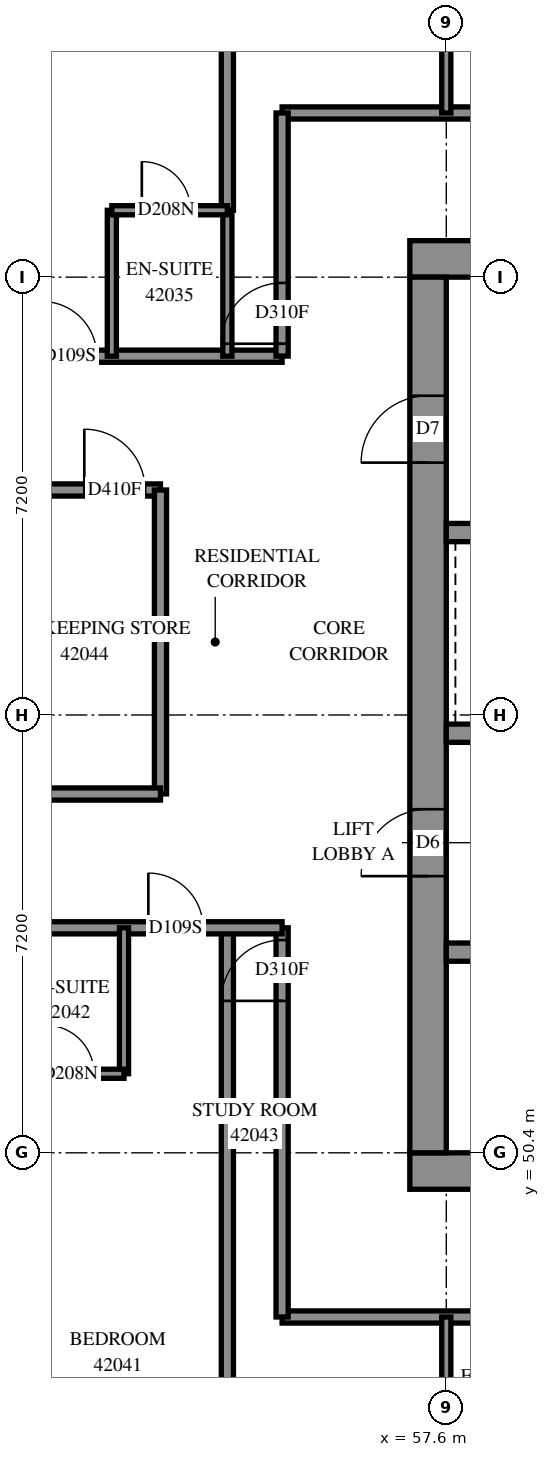
"""IFC4 building model, lengths in metres.
Left out: names, types, materials, properties, quantities, classifications, styles, units other than length and angle.
Written with IfcOpenShell. Run it as: python <this file> out.ifc"""

import sys

from ifc_helpers import new_model, si_unit, direction, frame, frame_2d, origin, place, context, subcontext, project, spatial, rectangle, extrude, element, fill, save


model = new_model("IFC4")
c1 = context("Model", 3, precision=1e-05, world=origin(), true_north=direction((0.0, 1.0)))
c2 = subcontext(c1, "Body", "Model", "MODEL_VIEW")
j1 = project(units=[si_unit("LENGTHUNIT", "METRE"), si_unit("PLANEANGLEUNIT", "RADIAN")], contexts=[c1])
p1 = place(None, origin())
s1 = spatial("IfcSite", under=j1, at=p1, CompositionType="ELEMENT")
p2 = place(p1, origin())
s2 = spatial("IfcBuilding", under=s1, at=p2, CompositionType="ELEMENT")
p3 = place(p2, frame((0.0, 0.0, 155.8)))
s3 = spatial("IfcBuildingStorey", under=s2, at=p3, CompositionType="ELEMENT", Elevation=155.8)
p4 = place(p3, frame((57.0, 50.1, -0.3), z_axis=(0.0, 0.0, 1.0), x_axis=(1.0, 0.0, 0.0)))
e1 = element("IfcWall", 1, at=p4, inside=s3, PredefinedType="SHEAR", context=c2, shape_type="SweptSolid", body=[
    extrude(rectangle(XDim=15.6, YDim=0.6, at=frame_2d((7.8, 0.0))), origin(), (0.0, 0.0, 1.0), 2.7),
])
p5 = place(p3, frame((57.0, 65.1, -0.3), z_axis=(0.0, 0.0, 1.0), x_axis=(1.0, 0.0, 0.0)))
e2 = element("IfcWall", 2, at=p5, inside=s3, PredefinedType="SHEAR", context=c2, shape_type="SweptSolid", body=[
    extrude(rectangle(XDim=15.6, YDim=0.6, at=frame_2d((7.8, 0.0))), origin(), (0.0, 0.0, 1.0), 2.7),
])
p6 = place(p5, frame((10.6, 0.0, 0.3)))
e3 = element("IfcOpeningElement", 3, at=p6, cuts=e2, PredefinedType="OPENING", context=c2, shape_type="SweptSolid", body=[
    extrude(rectangle(XDim=0.8, YDim=2.1, at=frame_2d((0.4, 1.05))), frame((0.0, 0.31, 0.0), z_axis=(0.0, -1.0, 0.0), x_axis=(1.0, 0.0, 0.0)), (0.0, 0.0, 1.0), 0.62),
])
p7 = place(p3, frame((57.3, 50.4, -0.3), z_axis=(0.0, 0.0, 1.0), x_axis=(0.0, 1.0, 0.0)))
e4 = element("IfcWall", 4, at=p7, inside=s3, PredefinedType="SHEAR", context=c2, shape_type="SweptSolid", body=[
    extrude(rectangle(XDim=14.4, YDim=0.6, at=frame_2d((7.2, 0.0))), origin(), (0.0, 0.0, 1.0), 2.7),
])
p8 = place(p7, frame((4.55, 0.0, 0.3)))
e5 = element("IfcOpeningElement", 5, at=p8, cuts=e4, PredefinedType="OPENING", context=c2, shape_type="SweptSolid", body=[
    extrude(rectangle(XDim=1.1, YDim=2.1, at=frame_2d((0.55, 1.05))), frame((0.0, 0.31, 0.0), z_axis=(0.0, -1.0, 0.0), x_axis=(1.0, 0.0, 0.0)), (0.0, 0.0, 1.0), 0.62),
])
p9 = place(p7, frame((11.35, 0.0, 0.3)))
e6 = element("IfcOpeningElement", 6, at=p9, cuts=e4, PredefinedType="OPENING", context=c2, shape_type="SweptSolid", body=[
    extrude(rectangle(XDim=1.1, YDim=2.1, at=frame_2d((0.55, 1.05))), frame((0.0, 0.31, 0.0), z_axis=(0.0, -1.0, 0.0), x_axis=(1.0, 0.0, 0.0)), (0.0, 0.0, 1.0), 0.62),
])
p10 = place(p3, frame((57.6, 53.7, 0.0), z_axis=(0.0, 0.0, 1.0), x_axis=(1.0, 0.0, 0.0)))
e7 = element("IfcWall", 7, at=p10, inside=s3, PredefinedType="SOLIDWALL", context=c2, shape_type="SweptSolid", body=[
    extrude(rectangle(XDim=14.4, YDim=0.3, at=frame_2d((7.2, 0.0))), origin(), (0.0, 0.0, 1.0), 3.1),
])
p11 = place(p10, frame((1.35, 0.0, 0.0)))
e8 = element("IfcOpeningElement", 8, at=p11, cuts=e7, PredefinedType="OPENING", context=c2, shape_type="SweptSolid", body=[
    extrude(rectangle(XDim=0.9, YDim=2.1, at=frame_2d((0.45, 1.05))), frame((0.0, 0.16, 0.0), z_axis=(0.0, -1.0, 0.0), x_axis=(1.0, 0.0, 0.0)), (0.0, 0.0, 1.0), 0.32),
])
p12 = place(p10, frame((4.95, 0.0, 0.0)))
e9 = element("IfcOpeningElement", 9, at=p12, cuts=e7, PredefinedType="OPENING", context=c2, shape_type="SweptSolid", body=[
    extrude(rectangle(XDim=0.9, YDim=2.1, at=frame_2d((0.45, 1.05))), frame((0.0, 0.16, 0.0), z_axis=(0.0, -1.0, 0.0), x_axis=(1.0, 0.0, 0.0)), (0.0, 0.0, 1.0), 0.32),
])
p13 = place(p10, frame((8.55, 0.0, 0.0)))
e10 = element("IfcOpeningElement", 10, at=p13, cuts=e7, PredefinedType="OPENING", context=c2, shape_type="SweptSolid", body=[
    extrude(rectangle(XDim=0.9, YDim=2.1, at=frame_2d((0.45, 1.05))), frame((0.0, 0.16, 0.0), z_axis=(0.0, -1.0, 0.0), x_axis=(1.0, 0.0, 0.0)), (0.0, 0.0, 1.0), 0.32),
])
p14 = place(p10, frame((12.05, 0.0, 0.0)))
e11 = element("IfcOpeningElement", 11, at=p14, cuts=e7, PredefinedType="OPENING", context=c2, shape_type="SweptSolid", body=[
    extrude(rectangle(XDim=1.1, YDim=2.1, at=frame_2d((0.55, 1.05))), frame((0.0, 0.16, 0.0), z_axis=(0.0, -1.0, 0.0), x_axis=(1.0, 0.0, 0.0)), (0.0, 0.0, 1.0), 0.32),
])
p15 = place(p3, frame((57.6, 57.3, 0.0), z_axis=(0.0, 0.0, 1.0), x_axis=(1.0, 0.0, 0.0)))
e12 = element("IfcWall", 12, at=p15, inside=s3, PredefinedType="SOLIDWALL", context=c2, shape_type="SweptSolid", body=[
    extrude(rectangle(XDim=14.4, YDim=0.3, at=frame_2d((7.2, 0.0))), origin(), (0.0, 0.0, 1.0), 3.1),
])
p16 = place(p15, frame((1.25, 0.0, 0.0)))
e13 = element("IfcOpeningElement", 13, at=p16, cuts=e12, PredefinedType="OPENING", context=c2, shape_type="SweptSolid", body=[
    extrude(rectangle(XDim=1.1, YDim=2.1, at=frame_2d((0.55, 1.05))), frame((0.0, 0.16, 0.0), z_axis=(0.0, -1.0, 0.0), x_axis=(1.0, 0.0, 0.0)), (0.0, 0.0, 1.0), 0.32),
])
p17 = place(p15, frame((4.85, 0.0, 0.0)))
e14 = element("IfcOpeningElement", 14, at=p17, cuts=e12, PredefinedType="OPENING", context=c2, shape_type="SweptSolid", body=[
    extrude(rectangle(XDim=1.1, YDim=2.1, at=frame_2d((0.55, 1.05))), frame((0.0, 0.16, 0.0), z_axis=(0.0, -1.0, 0.0), x_axis=(1.0, 0.0, 0.0)), (0.0, 0.0, 1.0), 0.32),
])
p18 = place(p15, frame((8.45, 0.0, 0.0)))
e15 = element("IfcOpeningElement", 15, at=p18, cuts=e12, PredefinedType="OPENING", context=c2, shape_type="SweptSolid", body=[
    extrude(rectangle(XDim=1.1, YDim=2.1, at=frame_2d((0.55, 1.05))), frame((0.0, 0.16, 0.0), z_axis=(0.0, -1.0, 0.0), x_axis=(1.0, 0.0, 0.0)), (0.0, 0.0, 1.0), 0.32),
])
p19 = place(p15, frame((12.05, 0.0, 0.0)))
e16 = element("IfcOpeningElement", 16, at=p19, cuts=e12, PredefinedType="OPENING", context=c2, shape_type="SweptSolid", body=[
    extrude(rectangle(XDim=1.1, YDim=2.1, at=frame_2d((0.55, 1.05))), frame((0.0, 0.16, 0.0), z_axis=(0.0, -1.0, 0.0), x_axis=(1.0, 0.0, 0.0)), (0.0, 0.0, 1.0), 0.32),
])
p20 = place(p3, frame((57.6, 60.6, 0.0), z_axis=(0.0, 0.0, 1.0), x_axis=(1.0, 0.0, 0.0)))
e17 = element("IfcWall", 17, at=p20, inside=s3, PredefinedType="SOLIDWALL", context=c2, shape_type="SweptSolid", body=[
    extrude(rectangle(XDim=7.2, YDim=0.3, at=frame_2d((3.6, 0.0))), origin(), (0.0, 0.0, 1.0), 3.1),
])
p21 = place(p3, frame((54.9, 67.5, 0.0), z_axis=(0.0, 0.0, 1.0), x_axis=(1.0, 0.0, 0.0)))
e18 = element("IfcWall", 18, at=p21, inside=s3, PredefinedType="PARTITIONING", context=c2, shape_type="SweptSolid", body=[
    extrude(rectangle(XDim=19.8, YDim=0.2, at=frame_2d((9.9, 0.0))), origin(), (0.0, 0.0, 1.0), 3.1),
])
p22 = place(p21, frame((6.599, 0.0, 0.0)))
e19 = element("IfcOpeningElement", 19, at=p22, cuts=e18, PredefinedType="OPENING", context=c2, shape_type="SweptSolid", body=[
    extrude(rectangle(XDim=0.9, YDim=2.1, at=frame_2d((0.45, 1.05))), frame((0.0, 0.11, 0.0), z_axis=(0.0, -1.0, 0.0), x_axis=(1.0, 0.0, 0.0)), (0.0, 0.0, 1.0), 0.22),
])
p23 = place(p21, frame((13.799, 0.0, 0.0)))
e20 = element("IfcOpeningElement", 20, at=p23, cuts=e18, PredefinedType="OPENING", context=c2, shape_type="SweptSolid", body=[
    extrude(rectangle(XDim=0.9, YDim=2.1, at=frame_2d((0.45, 1.05))), frame((0.0, 0.11, 0.0), z_axis=(0.0, -1.0, 0.0), x_axis=(1.0, 0.0, 0.0)), (0.0, 0.0, 1.0), 0.22),
])
p24 = place(p3, frame((54.9, 47.7, 0.0), z_axis=(0.0, 0.0, 1.0), x_axis=(1.0, 0.0, 0.0)))
e21 = element("IfcWall", 21, at=p24, inside=s3, PredefinedType="PARTITIONING", context=c2, shape_type="SweptSolid", body=[
    extrude(rectangle(XDim=19.326, YDim=0.2, at=frame_2d((9.663, 0.0))), origin(), (0.0, 0.0, 1.0), 3.1),
])
p25 = place(p24, frame((6.643, 0.0, 0.0)))
e22 = element("IfcOpeningElement", 22, at=p25, cuts=e21, PredefinedType="OPENING", context=c2, shape_type="SweptSolid", body=[
    extrude(rectangle(XDim=0.9, YDim=2.1, at=frame_2d((0.45, 1.05))), frame((0.0, 0.11, 0.0), z_axis=(0.0, -1.0, 0.0), x_axis=(1.0, 0.0, 0.0)), (0.0, 0.0, 1.0), 0.22),
])
p26 = place(p24, frame((13.843, 0.0, 0.0)))
e23 = element("IfcOpeningElement", 23, at=p26, cuts=e21, PredefinedType="OPENING", context=c2, shape_type="SweptSolid", body=[
    extrude(rectangle(XDim=0.9, YDim=2.1, at=frame_2d((0.45, 1.05))), frame((0.0, 0.11, 0.0), z_axis=(0.0, -1.0, 0.0), x_axis=(1.0, 0.0, 0.0)), (0.0, 0.0, 1.0), 0.22),
])
p27 = place(p3, frame((36.0, 61.3, 0.0), z_axis=(0.0, 0.0, 1.0), x_axis=(1.0, 0.0, 0.0)))
e24 = element("IfcWall", 24, at=p27, inside=s3, PredefinedType="PARTITIONING", context=c2, shape_type="SweptSolid", body=[
    extrude(rectangle(XDim=16.9, YDim=0.2, at=frame_2d((8.45, 0.0))), origin(), (0.0, 0.0, 1.0), 3.1),
])
p28 = place(p27, frame((2.3, 0.0, 0.0)))
e25 = element("IfcOpeningElement", 25, at=p28, cuts=e24, PredefinedType="OPENING", context=c2, shape_type="SweptSolid", body=[
    extrude(rectangle(XDim=0.9, YDim=2.1, at=frame_2d((0.45, 1.05))), frame((0.0, 0.11, 0.0), z_axis=(0.0, -1.0, 0.0), x_axis=(1.0, 0.0, 0.0)), (0.0, 0.0, 1.0), 0.22),
])
p29 = place(p27, frame((4.125, 0.0, 0.0)))
e26 = element("IfcOpeningElement", 26, at=p29, cuts=e24, PredefinedType="OPENING", context=c2, shape_type="SweptSolid", body=[
    extrude(rectangle(XDim=1.0, YDim=2.1, at=frame_2d((0.5, 1.05))), frame((0.0, 0.11, 0.0), z_axis=(0.0, -1.0, 0.0), x_axis=(1.0, 0.0, 0.0)), (0.0, 0.0, 1.0), 0.22),
])
p30 = place(p27, frame((9.5, 0.0, 0.0)))
e27 = element("IfcOpeningElement", 27, at=p30, cuts=e24, PredefinedType="OPENING", context=c2, shape_type="SweptSolid", body=[
    extrude(rectangle(XDim=0.9, YDim=2.1, at=frame_2d((0.45, 1.05))), frame((0.0, 0.11, 0.0), z_axis=(0.0, -1.0, 0.0), x_axis=(1.0, 0.0, 0.0)), (0.0, 0.0, 1.0), 0.22),
])
p31 = place(p27, frame((11.325, 0.0, 0.0)))
e28 = element("IfcOpeningElement", 28, at=p31, cuts=e24, PredefinedType="OPENING", context=c2, shape_type="SweptSolid", body=[
    extrude(rectangle(XDim=1.0, YDim=2.1, at=frame_2d((0.5, 1.05))), frame((0.0, 0.11, 0.0), z_axis=(0.0, -1.0, 0.0), x_axis=(1.0, 0.0, 0.0)), (0.0, 0.0, 1.0), 0.22),
])
p32 = place(p27, frame((15.647, 0.0, 0.0)))
e29 = element("IfcOpeningElement", 29, at=p32, cuts=e24, PredefinedType="OPENING", context=c2, shape_type="SweptSolid", body=[
    extrude(rectangle(XDim=1.0, YDim=2.1, at=frame_2d((0.5, 1.05))), frame((0.0, 0.11, 0.0), z_axis=(0.0, -1.0, 0.0), x_axis=(1.0, 0.0, 0.0)), (0.0, 0.0, 1.0), 0.22),
])
p33 = place(p3, frame((40.702, 63.5, 0.0), z_axis=(0.0, 0.0, 1.0), x_axis=(1.0, 0.0, 0.0)))
e30 = element("IfcWall", 30, at=p33, inside=s3, PredefinedType="PARTITIONING", context=c2, shape_type="SweptSolid", body=[
    extrude(rectangle(XDim=14.198, YDim=0.2, at=frame_2d((7.099, 0.0))), origin(), (0.0, 0.0, 1.0), 3.1),
])
p34 = place(p33, frame((6.692, 0.0, 0.0)))
e31 = element("IfcOpeningElement", 31, at=p34, cuts=e30, PredefinedType="OPENING", context=c2, shape_type="SweptSolid", body=[
    extrude(rectangle(XDim=0.9, YDim=2.1, at=frame_2d((0.45, 1.05))), frame((0.0, 0.11, 0.0), z_axis=(0.0, -1.0, 0.0), x_axis=(1.0, 0.0, 0.0)), (0.0, 0.0, 1.0), 0.22),
])
p35 = place(p33, frame((10.25, 0.0, 0.0)))
e32 = element("IfcOpeningElement", 32, at=p35, cuts=e30, PredefinedType="OPENING", context=c2, shape_type="SweptSolid", body=[
    extrude(rectangle(XDim=0.9, YDim=2.1, at=frame_2d((0.45, 1.05))), frame((0.0, 0.11, 0.0), z_axis=(0.0, -1.0, 0.0), x_axis=(1.0, 0.0, 0.0)), (0.0, 0.0, 1.0), 0.22),
])
p36 = place(p3, frame((54.0, 42.309, 0.0), z_axis=(0.0, 0.0, 1.0), x_axis=(0.0, 1.0, 0.0)))
e33 = element("IfcWall", 33, at=p36, inside=s3, PredefinedType="PARTITIONING", context=c2, shape_type="SweptSolid", body=[
    extrude(rectangle(XDim=11.791, YDim=0.2, at=frame_2d((5.895, 0.0))), origin(), (0.0, 0.0, 1.0), 3.1),
])
p37 = place(p3, frame((54.0, 65.9, 0.0), z_axis=(0.0, 0.0, 1.0), x_axis=(0.0, 1.0, 0.0)))
e34 = element("IfcWall", 34, at=p37, inside=s3, PredefinedType="PARTITIONING", context=c2, shape_type="SweptSolid", body=[
    extrude(rectangle(XDim=6.855, YDim=0.2, at=frame_2d((3.428, 0.0))), origin(), (0.0, 0.0, 1.0), 3.1),
])
p38 = place(p3, frame((54.9, 47.7, 0.0), z_axis=(0.0, 0.0, 1.0), x_axis=(0.0, 1.0, 0.0)))
e35 = element("IfcWall", 35, at=p38, inside=s3, PredefinedType="PARTITIONING", context=c2, shape_type="SweptSolid", body=[
    extrude(rectangle(XDim=6.4, YDim=0.2, at=frame_2d((3.2, 0.0))), origin(), (0.0, 0.0, 1.0), 3.1),
])
p39 = place(p38, frame((5.199, 0.0, 0.0)))
e36 = element("IfcOpeningElement", 36, at=p39, cuts=e35, PredefinedType="OPENING", context=c2, shape_type="SweptSolid", body=[
    extrude(rectangle(XDim=1.0, YDim=2.1, at=frame_2d((0.5, 1.05))), frame((0.0, 0.11, 0.0), z_axis=(0.0, -1.0, 0.0), x_axis=(1.0, 0.0, 0.0)), (0.0, 0.0, 1.0), 0.22),
])
p40 = place(p3, frame((52.9, 56.302, 0.0), z_axis=(0.0, 0.0, 1.0), x_axis=(0.0, 1.0, 0.0)))
e37 = element("IfcWall", 37, at=p40, inside=s3, PredefinedType="PARTITIONING", context=c2, shape_type="SweptSolid", body=[
    extrude(rectangle(XDim=4.998, YDim=0.2, at=frame_2d((2.499, 0.0))), origin(), (0.0, 0.0, 1.0), 3.1),
])
p41 = place(p3, frame((50.4, 54.1, 0.0), z_axis=(0.0, 0.0, 1.0), x_axis=(1.0, 0.0, 0.0)))
e38 = element("IfcWall", 38, at=p41, inside=s3, PredefinedType="PARTITIONING", context=c2, shape_type="SweptSolid", body=[
    extrude(rectangle(XDim=4.5, YDim=0.2, at=frame_2d((2.25, 0.0))), origin(), (0.0, 0.0, 1.0), 3.1),
])
p42 = place(p41, frame((2.3, 0.0, 0.0)))
e39 = element("IfcOpeningElement", 39, at=p42, cuts=e38, PredefinedType="OPENING", context=c2, shape_type="SweptSolid", body=[
    extrude(rectangle(XDim=0.9, YDim=2.1, at=frame_2d((0.45, 1.05))), frame((0.0, 0.11, 0.0), z_axis=(0.0, -1.0, 0.0), x_axis=(1.0, 0.0, 0.0)), (0.0, 0.0, 1.0), 0.22),
])
p43 = place(p3, frame((54.9, 63.502, 0.0), z_axis=(0.0, 0.0, 1.0), x_axis=(0.0, 1.0, 0.0)))
e40 = element("IfcWall", 40, at=p43, inside=s3, PredefinedType="PARTITIONING", context=c2, shape_type="SweptSolid", body=[
    extrude(rectangle(XDim=3.998, YDim=0.2, at=frame_2d((1.999, 0.0))), origin(), (0.0, 0.0, 1.0), 3.1),
])
p44 = place(p43, frame((0.203, 0.0, 0.0)))
e41 = element("IfcOpeningElement", 41, at=p44, cuts=e40, PredefinedType="OPENING", context=c2, shape_type="SweptSolid", body=[
    extrude(rectangle(XDim=1.0, YDim=2.1, at=frame_2d((0.5, 1.05))), frame((0.0, 0.11, 0.0), z_axis=(0.0, -1.0, 0.0), x_axis=(1.0, 0.0, 0.0)), (0.0, 0.0, 1.0), 0.22),
])
p45 = place(p3, frame((50.4, 56.3, 0.0), z_axis=(0.0, 0.0, 1.0), x_axis=(1.0, 0.0, 0.0)))
e42 = element("IfcWall", 42, at=p45, inside=s3, PredefinedType="PARTITIONING", context=c2, shape_type="SweptSolid", body=[
    extrude(rectangle(XDim=2.5, YDim=0.2, at=frame_2d((1.25, 0.0))), origin(), (0.0, 0.0, 1.0), 3.1),
])
for number, where, z_axis, x_axis in (
    (43, (52.1, 63.5, 0.0), (0.0, 0.0, 1.0), (0.0, 1.0, 0.0)),
    (44, (54.0, 63.5, 0.0), (0.0, 0.0, 1.0), (0.0, 1.0, 0.0)),
    (45, (57.6, 45.3, 0.0), (0.0, 0.0, 1.0), (0.0, 1.0, 0.0)),
    (46, (57.6, 67.5, 0.0), (0.0, 0.0, 1.0), (0.0, 1.0, 0.0)),
    (47, (52.3, 51.7, 0.0), (0.0, 0.0, 1.0), (0.0, 1.0, 0.0)),
):
    element("IfcWall", number, at=place(p3, frame(where, z_axis=z_axis, x_axis=x_axis)), inside=s3, PredefinedType="PARTITIONING", context=c2, shape_type="SweptSolid", body=[
        extrude(rectangle(XDim=2.4, YDim=0.15, at=frame_2d((1.2, 0.0))), origin(), (0.0, 0.0, 1.0), 3.1),
    ])
p46 = place(p3, frame((52.1, 65.9, 0.0), z_axis=(0.0, 0.0, 1.0), x_axis=(1.0, 0.0, 0.0)))
e48 = element("IfcWall", 48, at=p46, inside=s3, PredefinedType="PARTITIONING", context=c2, shape_type="SweptSolid", body=[
    extrude(rectangle(XDim=1.9, YDim=0.15, at=frame_2d((0.95, 0.0))), origin(), (0.0, 0.0, 1.0), 3.1),
])
p47 = place(p46, frame((0.493, 0.0, 0.0)))
e49 = element("IfcOpeningElement", 49, at=p47, cuts=e48, PredefinedType="OPENING", context=c2, shape_type="SweptSolid", body=[
    extrude(rectangle(XDim=0.8, YDim=2.1, at=frame_2d((0.4, 1.05))), frame((0.0, 0.085, 0.0), z_axis=(0.0, -1.0, 0.0), x_axis=(1.0, 0.0, 0.0)), (0.0, 0.0, 1.0), 0.17),
])
p48 = place(p3, frame((50.4, 51.7, 0.0), z_axis=(0.0, 0.0, 1.0), x_axis=(1.0, 0.0, 0.0)))
e50 = element("IfcWall", 50, at=p48, inside=s3, PredefinedType="PARTITIONING", context=c2, shape_type="SweptSolid", body=[
    extrude(rectangle(XDim=1.9, YDim=0.15, at=frame_2d((0.95, 0.0))), origin(), (0.0, 0.0, 1.0), 3.1),
])
p49 = place(p48, frame((0.607, 0.0, 0.0)))
e51 = element("IfcOpeningElement", 51, at=p49, cuts=e50, PredefinedType="OPENING", context=c2, shape_type="SweptSolid", body=[
    extrude(rectangle(XDim=0.8, YDim=2.1, at=frame_2d((0.4, 1.05))), frame((0.0, 0.085, 0.0), z_axis=(0.0, -1.0, 0.0), x_axis=(1.0, 0.0, 0.0)), (0.0, 0.0, 1.0), 0.17),
])
p50 = place(p8, origin())
e52 = element("IfcDoor", 52, at=p50, inside=s3, OperationType="DOUBLE_DOOR_SINGLE_SWING", PredefinedType="DOOR", context=c2, shape_type="SweptSolid", body=[
    extrude(rectangle(XDim=1.1, YDim=2.1, at=frame_2d((0.55, 1.05))), frame((0.0, 0.025, 0.0), z_axis=(0.0, -1.0, 0.0), x_axis=(1.0, 0.0, 0.0)), (0.0, 0.0, 1.0), 0.05),
])
fill(e5, e52)
p51 = place(p9, origin())
e53 = element("IfcDoor", 53, at=p51, inside=s3, OperationType="SINGLE_SWING_LEFT", PredefinedType="DOOR", context=c2, shape_type="SweptSolid", body=[
    extrude(rectangle(XDim=1.1, YDim=2.1, at=frame_2d((0.55, 1.05))), frame((0.0, 0.025, 0.0), z_axis=(0.0, -1.0, 0.0), x_axis=(1.0, 0.0, 0.0)), (0.0, 0.0, 1.0), 0.05),
])
fill(e6, e53)
p52 = place(p35, origin())
e54 = element("IfcDoor", 54, at=p52, inside=s3, OperationType="SINGLE_SWING_RIGHT", PredefinedType="DOOR", context=c2, shape_type="SweptSolid", body=[
    extrude(rectangle(XDim=0.9, YDim=2.1, at=frame_2d((0.45, 1.05))), frame((0.0, 0.025, 0.0), z_axis=(0.0, -1.0, 0.0), x_axis=(1.0, 0.0, 0.0)), (0.0, 0.0, 1.0), 0.05),
])
fill(e32, e54)
p53 = place(p47, origin())
e55 = element("IfcDoor", 55, at=p53, inside=s3, OperationType="SINGLE_SWING_RIGHT", PredefinedType="DOOR", context=c2, shape_type="SweptSolid", body=[
    extrude(rectangle(XDim=0.8, YDim=2.1, at=frame_2d((0.4, 1.05))), frame((0.0, 0.025, 0.0), z_axis=(0.0, -1.0, 0.0), x_axis=(1.0, 0.0, 0.0)), (0.0, 0.0, 1.0), 0.05),
])
fill(e49, e55)
p54 = place(p44, origin())
e56 = element("IfcDoor", 56, at=p54, inside=s3, OperationType="SINGLE_SWING_LEFT", PredefinedType="DOOR", context=c2, shape_type="SweptSolid", body=[
    extrude(rectangle(XDim=1.0, YDim=2.1, at=frame_2d((0.5, 1.05))), frame((0.0, 0.025, 0.0), z_axis=(0.0, -1.0, 0.0), x_axis=(1.0, 0.0, 0.0)), (0.0, 0.0, 1.0), 0.05),
])
fill(e41, e56)
p55 = place(p42, origin())
e57 = element("IfcDoor", 57, at=p55, inside=s3, OperationType="SINGLE_SWING_LEFT", PredefinedType="DOOR", context=c2, shape_type="SweptSolid", body=[
    extrude(rectangle(XDim=0.9, YDim=2.1, at=frame_2d((0.45, 1.05))), frame((0.0, 0.025, 0.0), z_axis=(0.0, -1.0, 0.0), x_axis=(1.0, 0.0, 0.0)), (0.0, 0.0, 1.0), 0.05),
])
fill(e39, e57)
p56 = place(p49, origin())
e58 = element("IfcDoor", 58, at=p56, inside=s3, OperationType="SINGLE_SWING_RIGHT", PredefinedType="DOOR", context=c2, shape_type="SweptSolid", body=[
    extrude(rectangle(XDim=0.8, YDim=2.1, at=frame_2d((0.4, 1.05))), frame((0.0, 0.025, 0.0), z_axis=(0.0, -1.0, 0.0), x_axis=(1.0, 0.0, 0.0)), (0.0, 0.0, 1.0), 0.05),
])
fill(e51, e58)
p57 = place(p39, origin())
e59 = element("IfcDoor", 59, at=p57, inside=s3, OperationType="SINGLE_SWING_RIGHT", PredefinedType="DOOR", context=c2, shape_type="SweptSolid", body=[
    extrude(rectangle(XDim=1.0, YDim=2.1, at=frame_2d((0.5, 1.05))), frame((0.0, 0.025, 0.0), z_axis=(0.0, -1.0, 0.0), x_axis=(1.0, 0.0, 0.0)), (0.0, 0.0, 1.0), 0.05),
])
fill(e36, e59)
p58 = place(p32, origin())
e60 = element("IfcDoor", 60, at=p58, inside=s3, OperationType="SINGLE_SWING_LEFT", PredefinedType="DOOR", context=c2, shape_type="SweptSolid", body=[
    extrude(rectangle(XDim=1.0, YDim=2.1, at=frame_2d((0.5, 1.05))), frame((0.0, 0.025, 0.0), z_axis=(0.0, -1.0, 0.0), x_axis=(1.0, 0.0, 0.0)), (0.0, 0.0, 1.0), 0.05),
])
fill(e29, e60)
save(model, sys.argv[1])
